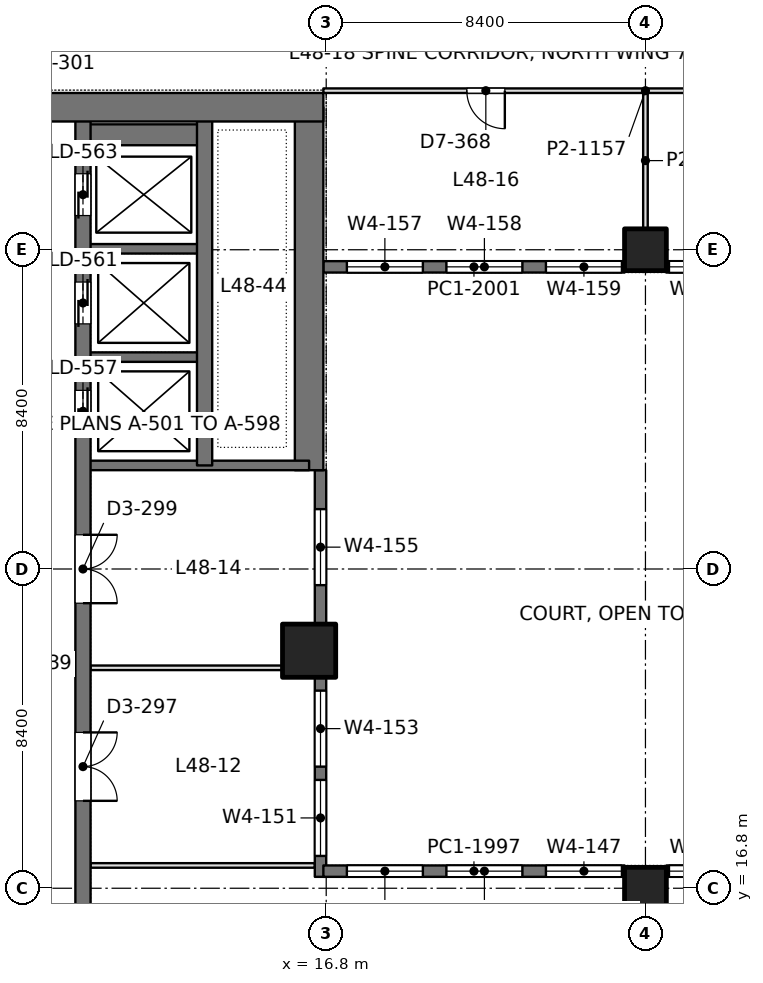
"""IFC4 building model, lengths in metres.
Left out: names, types, materials, properties, quantities, classifications, styles, units other than length and angle.
Written with IfcOpenShell. Run it as: python <this file> out.ifc"""

import sys

from ifc_helpers import new_model, si_unit, direction, frame, frame_2d, origin, origin_2d, place, context, subcontext, project, spatial, rectangle, extrude, element, fill, save


model = new_model("IFC4")
c1 = context("Model", 3, precision=1e-05, world=origin(), true_north=direction((0.0, 1.0)))
c2 = subcontext(c1, "Body", "Model", "MODEL_VIEW")
j1 = project(units=[si_unit("LENGTHUNIT", "METRE"), si_unit("PLANEANGLEUNIT", "RADIAN")], contexts=[c1])
p1 = place(None, origin())
s1 = spatial("IfcSite", under=j1, at=p1, CompositionType="ELEMENT")
p2 = place(p1, origin())
s2 = spatial("IfcBuilding", under=s1, at=p2, CompositionType="ELEMENT")
p3 = place(p2, frame((0.0, 0.0, 211.2)))
s3 = spatial("IfcBuildingStorey", under=s2, at=p3, CompositionType="ELEMENT", Elevation=211.2)
for number, where, z_axis, x_axis in (
    (1, (25.2, 16.8, 0.0), (0.0, 0.0, 1.0), (1.0, 0.0, 0.0)),
    (2, (25.2, 33.6, 0.0), (0.0, 0.0, 1.0), (1.0, 0.0, 0.0)),
):
    element("IfcColumn", number, at=place(p3, frame(where, z_axis=z_axis, x_axis=x_axis)), inside=s3, PredefinedType="COLUMN", context=c2, shape_type="SweptSolid", body=[
        extrude(rectangle(XDim=1.1, YDim=1.1, at=origin_2d()), origin(), (0.0, 0.0, 1.0), 4.2),
    ])
p4 = place(p3, frame((16.35, 23.05, 0.0), z_axis=(0.0, 0.0, 1.0), x_axis=(1.0, 0.0, 0.0)))
e3 = element("IfcColumn", 3, at=p4, inside=s3, PredefinedType="COLUMN", context=c2, shape_type="SweptSolid", body=[
    extrude(rectangle(XDim=1.4, YDim=1.4, at=origin_2d()), origin(), (0.0, 0.0, 1.0), 4.2),
])
p5 = place(p3, frame((-1.125, 37.35, 0.0), z_axis=(0.0, 0.0, 1.0), x_axis=(1.0, 0.0, 0.0)))
e4 = element("IfcWall", 4, at=p5, inside=s3, PredefinedType="SHEAR", context=c2, shape_type="SweptSolid", body=[
    extrude(rectangle(XDim=17.85, YDim=0.75, at=frame_2d((8.925, 0.0))), origin(), (0.0, 0.0, 1.0), 4.2),
])
p6 = place(p5, frame((8.875, 0.0, 0.0)))
e5 = element("IfcOpeningElement", 5, at=p6, cuts=e4, PredefinedType="OPENING", context=c2, shape_type="SweptSolid", body=[
    extrude(rectangle(XDim=1.8, YDim=2.4, at=frame_2d((0.9, 1.2))), frame((0.0, 0.385, 0.0), z_axis=(0.0, -1.0, 0.0), x_axis=(1.0, 0.0, 0.0)), (0.0, 0.0, 1.0), 0.77),
])
p7 = place(p3, frame((16.35, 27.8, 0.0), z_axis=(0.0, 0.0, 1.0), x_axis=(0.0, 1.0, 0.0)))
e6 = element("IfcWall", 6, at=p7, inside=s3, PredefinedType="SHEAR", context=c2, shape_type="SweptSolid", body=[
    extrude(rectangle(XDim=9.55, YDim=0.75, at=frame_2d((4.775, 0.0))), origin(), (0.0, 0.0, 1.0), 4.2),
])
p8 = place(p3, frame((10.4, 13.05, 0.0), z_axis=(0.0, 0.0, 1.0), x_axis=(0.0, 1.0, 0.0)))
e7 = element("IfcWall", 7, at=p8, inside=s3, PredefinedType="SHEAR", context=c2, shape_type="SweptSolid", body=[
    extrude(rectangle(XDim=24.3, YDim=0.4, at=frame_2d((12.15, 0.0))), origin(), (0.0, 0.0, 1.0), 4.2),
])
p9 = place(p8, frame((15.75, 0.0, 0.0)))
e8 = element("IfcOpeningElement", 8, at=p9, cuts=e7, PredefinedType="OPENING", context=c2, shape_type="SweptSolid", body=[
    extrude(rectangle(XDim=1.1, YDim=2.2, at=frame_2d((0.55, 1.1))), frame((0.0, 0.21, 0.0), z_axis=(0.0, -1.0, 0.0), x_axis=(1.0, 0.0, 0.0)), (0.0, 0.0, 1.0), 0.42),
])
p10 = place(p8, frame((18.6, 0.0, 0.0)))
e9 = element("IfcOpeningElement", 9, at=p10, cuts=e7, PredefinedType="OPENING", context=c2, shape_type="SweptSolid", body=[
    extrude(rectangle(XDim=1.1, YDim=2.2, at=frame_2d((0.55, 1.1))), frame((0.0, 0.21, 0.0), z_axis=(0.0, -1.0, 0.0), x_axis=(1.0, 0.0, 0.0)), (0.0, 0.0, 1.0), 0.42),
])
p11 = place(p8, frame((21.45, 0.0, 0.0)))
e10 = element("IfcOpeningElement", 10, at=p11, cuts=e7, PredefinedType="OPENING", context=c2, shape_type="SweptSolid", body=[
    extrude(rectangle(XDim=1.1, YDim=2.2, at=frame_2d((0.55, 1.1))), frame((0.0, 0.21, 0.0), z_axis=(0.0, -1.0, 0.0), x_axis=(1.0, 0.0, 0.0)), (0.0, 0.0, 1.0), 0.42),
])
p12 = place(p8, frame((6.05, 0.0, 0.0)))
e11 = element("IfcOpeningElement", 11, at=p12, cuts=e7, PredefinedType="OPENING", context=c2, shape_type="SweptSolid", body=[
    extrude(rectangle(XDim=1.8, YDim=2.4, at=frame_2d((0.9, 1.2))), frame((0.0, 0.21, 0.0), z_axis=(0.0, -1.0, 0.0), x_axis=(1.0, 0.0, 0.0)), (0.0, 0.0, 1.0), 0.42),
])
p13 = place(p8, frame((11.25, 0.0, 0.0)))
e12 = element("IfcOpeningElement", 12, at=p13, cuts=e7, PredefinedType="OPENING", context=c2, shape_type="SweptSolid", body=[
    extrude(rectangle(XDim=1.8, YDim=2.4, at=frame_2d((0.9, 1.2))), frame((0.0, 0.21, 0.0), z_axis=(0.0, -1.0, 0.0), x_axis=(1.0, 0.0, 0.0)), (0.0, 0.0, 1.0), 0.42),
])
p14 = place(p3, frame((13.6, 27.925, 0.0), z_axis=(0.0, 0.0, 1.0), x_axis=(0.0, 1.0, 0.0)))
e13 = element("IfcWall", 13, at=p14, inside=s3, PredefinedType="SHEAR", context=c2, shape_type="SweptSolid", body=[
    extrude(rectangle(XDim=9.425, YDim=0.4, at=frame_2d((4.712, 0.0))), origin(), (0.0, 0.0, 1.0), 4.2),
])
p15 = place(p3, frame((10.4, 27.925, 0.0), z_axis=(0.0, 0.0, 1.0), x_axis=(1.0, 0.0, 0.0)))
e14 = element("IfcWall", 14, at=p15, inside=s3, PredefinedType="SHEAR", context=c2, shape_type="SweptSolid", body=[
    extrude(rectangle(XDim=5.95, YDim=0.25, at=frame_2d((2.975, 0.0))), origin(), (0.0, 0.0, 1.0), 4.2),
])
for number, where, z_axis, x_axis in (
    (15, (10.4, 30.775, 0.0), (0.0, 0.0, 1.0), (1.0, 0.0, 0.0)),
    (16, (10.4, 33.625, 0.0), (0.0, 0.0, 1.0), (1.0, 0.0, 0.0)),
):
    element("IfcWall", number, at=place(p3, frame(where, z_axis=z_axis, x_axis=x_axis)), inside=s3, PredefinedType="SHEAR", context=c2, shape_type="SweptSolid", body=[
        extrude(rectangle(XDim=3.2, YDim=0.25, at=frame_2d((1.6, 0.0))), origin(), (0.0, 0.0, 1.0), 4.2),
    ])
p16 = place(p3, frame((10.4, 36.625, 0.0), z_axis=(0.0, 0.0, 1.0), x_axis=(1.0, 0.0, 0.0)))
e17 = element("IfcWall", 17, at=p16, inside=s3, PredefinedType="SHEAR", context=c2, shape_type="SweptSolid", body=[
    extrude(rectangle(XDim=3.2, YDim=0.55, at=frame_2d((1.6, 0.0))), origin(), (0.0, 0.0, 1.0), 4.2),
])
p17 = place(p3, frame((16.65, 17.1, 0.0), z_axis=(0.0, 0.0, 1.0), x_axis=(0.0, 1.0, 0.0)))
e18 = element("IfcWall", 18, at=p17, inside=s3, PredefinedType="SOLIDWALL", context=c2, shape_type="SweptSolid", body=[
    extrude(rectangle(XDim=10.7, YDim=0.3, at=frame_2d((5.35, 0.0))), origin(), (0.0, 0.0, 1.0), 4.05),
])
p18 = place(p17, frame((0.55, 0.0, 0.9)))
e19 = element("IfcOpeningElement", 19, at=p18, cuts=e18, PredefinedType="OPENING", context=c2, shape_type="SweptSolid", body=[
    extrude(rectangle(XDim=2.0, YDim=1.9, at=frame_2d((1.0, 0.95))), frame((0.0, 0.16, 0.0), z_axis=(0.0, -1.0, 0.0), x_axis=(1.0, 0.0, 0.0)), (0.0, 0.0, 1.0), 0.32),
])
p19 = place(p17, frame((2.9, 0.0, 0.9)))
e20 = element("IfcOpeningElement", 20, at=p19, cuts=e18, PredefinedType="OPENING", context=c2, shape_type="SweptSolid", body=[
    extrude(rectangle(XDim=2.0, YDim=1.9, at=frame_2d((1.0, 0.95))), frame((0.0, 0.16, 0.0), z_axis=(0.0, -1.0, 0.0), x_axis=(1.0, 0.0, 0.0)), (0.0, 0.0, 1.0), 0.32),
])
p20 = place(p17, frame((7.675, 0.0, 0.9)))
e21 = element("IfcOpeningElement", 21, at=p20, cuts=e18, PredefinedType="OPENING", context=c2, shape_type="SweptSolid", body=[
    extrude(rectangle(XDim=2.0, YDim=1.9, at=frame_2d((1.0, 0.95))), frame((0.0, 0.16, 0.0), z_axis=(0.0, -1.0, 0.0), x_axis=(1.0, 0.0, 0.0)), (0.0, 0.0, 1.0), 0.32),
])
p21 = place(p3, frame((16.725, 17.25, 0.0), z_axis=(0.0, 0.0, 1.0), x_axis=(1.0, 0.0, 0.0)))
e22 = element("IfcWall", 22, at=p21, inside=s3, PredefinedType="SOLIDWALL", context=c2, shape_type="SweptSolid", body=[
    extrude(rectangle(XDim=7.925, YDim=0.3, at=frame_2d((3.962, 0.0))), origin(), (0.0, 0.0, 1.0), 4.05),
])
p22 = place(p21, frame((0.619, 0.0, 0.9)))
e23 = element("IfcOpeningElement", 23, at=p22, cuts=e22, PredefinedType="OPENING", context=c2, shape_type="SweptSolid", body=[
    extrude(rectangle(XDim=2.0, YDim=1.9, at=frame_2d((1.0, 0.95))), frame((0.0, 0.16, 0.0), z_axis=(0.0, -1.0, 0.0), x_axis=(1.0, 0.0, 0.0)), (0.0, 0.0, 1.0), 0.32),
])
p23 = place(p21, frame((3.238, 0.0, 0.9)))
e24 = element("IfcOpeningElement", 24, at=p23, cuts=e22, PredefinedType="OPENING", context=c2, shape_type="SweptSolid", body=[
    extrude(rectangle(XDim=2.0, YDim=1.9, at=frame_2d((1.0, 0.95))), frame((0.0, 0.16, 0.0), z_axis=(0.0, -1.0, 0.0), x_axis=(1.0, 0.0, 0.0)), (0.0, 0.0, 1.0), 0.32),
])
p24 = place(p21, frame((5.856, 0.0, 0.9)))
e25 = element("IfcOpeningElement", 25, at=p24, cuts=e22, PredefinedType="OPENING", context=c2, shape_type="SweptSolid", body=[
    extrude(rectangle(XDim=2.0, YDim=1.9, at=frame_2d((1.0, 0.95))), frame((0.0, 0.16, 0.0), z_axis=(0.0, -1.0, 0.0), x_axis=(1.0, 0.0, 0.0)), (0.0, 0.0, 1.0), 0.32),
])
p25 = place(p3, frame((25.75, 17.25, 0.0), z_axis=(0.0, 0.0, 1.0), x_axis=(1.0, 0.0, 0.0)))
e26 = element("IfcWall", 26, at=p25, inside=s3, PredefinedType="SOLIDWALL", context=c2, shape_type="SweptSolid", body=[
    extrude(rectangle(XDim=7.925, YDim=0.3, at=frame_2d((3.962, 0.0))), origin(), (0.0, 0.0, 1.0), 4.05),
])
p26 = place(p25, frame((0.069, 0.0, 0.9)))
e27 = element("IfcOpeningElement", 27, at=p26, cuts=e26, PredefinedType="OPENING", context=c2, shape_type="SweptSolid", body=[
    extrude(rectangle(XDim=2.0, YDim=1.9, at=frame_2d((1.0, 0.95))), frame((0.0, 0.16, 0.0), z_axis=(0.0, -1.0, 0.0), x_axis=(1.0, 0.0, 0.0)), (0.0, 0.0, 1.0), 0.32),
])
p27 = place(p25, frame((2.688, 0.0, 0.9)))
e28 = element("IfcOpeningElement", 28, at=p27, cuts=e26, PredefinedType="OPENING", context=c2, shape_type="SweptSolid", body=[
    extrude(rectangle(XDim=2.0, YDim=1.9, at=frame_2d((1.0, 0.95))), frame((0.0, 0.16, 0.0), z_axis=(0.0, -1.0, 0.0), x_axis=(1.0, 0.0, 0.0)), (0.0, 0.0, 1.0), 0.32),
])
p28 = place(p25, frame((5.306, 0.0, 0.9)))
e29 = element("IfcOpeningElement", 29, at=p28, cuts=e26, PredefinedType="OPENING", context=c2, shape_type="SweptSolid", body=[
    extrude(rectangle(XDim=2.0, YDim=1.9, at=frame_2d((1.0, 0.95))), frame((0.0, 0.16, 0.0), z_axis=(0.0, -1.0, 0.0), x_axis=(1.0, 0.0, 0.0)), (0.0, 0.0, 1.0), 0.32),
])
p29 = place(p3, frame((16.725, 33.15, 0.0), z_axis=(0.0, 0.0, 1.0), x_axis=(1.0, 0.0, 0.0)))
e30 = element("IfcWall", 30, at=p29, inside=s3, PredefinedType="SOLIDWALL", context=c2, shape_type="SweptSolid", body=[
    extrude(rectangle(XDim=7.925, YDim=0.3, at=frame_2d((3.962, 0.0))), origin(), (0.0, 0.0, 1.0), 4.05),
])
p30 = place(p29, frame((0.619, 0.0, 0.9)))
e31 = element("IfcOpeningElement", 31, at=p30, cuts=e30, PredefinedType="OPENING", context=c2, shape_type="SweptSolid", body=[
    extrude(rectangle(XDim=2.0, YDim=1.9, at=frame_2d((1.0, 0.95))), frame((0.0, 0.16, 0.0), z_axis=(0.0, -1.0, 0.0), x_axis=(1.0, 0.0, 0.0)), (0.0, 0.0, 1.0), 0.32),
])
p31 = place(p29, frame((3.238, 0.0, 0.9)))
e32 = element("IfcOpeningElement", 32, at=p31, cuts=e30, PredefinedType="OPENING", context=c2, shape_type="SweptSolid", body=[
    extrude(rectangle(XDim=2.0, YDim=1.9, at=frame_2d((1.0, 0.95))), frame((0.0, 0.16, 0.0), z_axis=(0.0, -1.0, 0.0), x_axis=(1.0, 0.0, 0.0)), (0.0, 0.0, 1.0), 0.32),
])
p32 = place(p29, frame((5.856, 0.0, 0.9)))
e33 = element("IfcOpeningElement", 33, at=p32, cuts=e30, PredefinedType="OPENING", context=c2, shape_type="SweptSolid", body=[
    extrude(rectangle(XDim=2.0, YDim=1.9, at=frame_2d((1.0, 0.95))), frame((0.0, 0.16, 0.0), z_axis=(0.0, -1.0, 0.0), x_axis=(1.0, 0.0, 0.0)), (0.0, 0.0, 1.0), 0.32),
])
p33 = place(p3, frame((25.75, 33.15, 0.0), z_axis=(0.0, 0.0, 1.0), x_axis=(1.0, 0.0, 0.0)))
e34 = element("IfcWall", 34, at=p33, inside=s3, PredefinedType="SOLIDWALL", context=c2, shape_type="SweptSolid", body=[
    extrude(rectangle(XDim=7.925, YDim=0.3, at=frame_2d((3.962, 0.0))), origin(), (0.0, 0.0, 1.0), 4.05),
])
p34 = place(p33, frame((0.069, 0.0, 0.9)))
e35 = element("IfcOpeningElement", 35, at=p34, cuts=e34, PredefinedType="OPENING", context=c2, shape_type="SweptSolid", body=[
    extrude(rectangle(XDim=2.0, YDim=1.9, at=frame_2d((1.0, 0.95))), frame((0.0, 0.16, 0.0), z_axis=(0.0, -1.0, 0.0), x_axis=(1.0, 0.0, 0.0)), (0.0, 0.0, 1.0), 0.32),
])
p35 = place(p33, frame((2.688, 0.0, 0.9)))
e36 = element("IfcOpeningElement", 36, at=p35, cuts=e34, PredefinedType="OPENING", context=c2, shape_type="SweptSolid", body=[
    extrude(rectangle(XDim=2.0, YDim=1.9, at=frame_2d((1.0, 0.95))), frame((0.0, 0.16, 0.0), z_axis=(0.0, -1.0, 0.0), x_axis=(1.0, 0.0, 0.0)), (0.0, 0.0, 1.0), 0.32),
])
p36 = place(p33, frame((5.306, 0.0, 0.9)))
e37 = element("IfcOpeningElement", 37, at=p36, cuts=e34, PredefinedType="OPENING", context=c2, shape_type="SweptSolid", body=[
    extrude(rectangle(XDim=2.0, YDim=1.9, at=frame_2d((1.0, 0.95))), frame((0.0, 0.16, 0.0), z_axis=(0.0, -1.0, 0.0), x_axis=(1.0, 0.0, 0.0)), (0.0, 0.0, 1.0), 0.32),
])
p37 = place(p3, frame((10.598, 17.4, 0.0), z_axis=(0.0, 0.0, 1.0), x_axis=(1.0, 0.0, 0.0)))
e38 = element("IfcWall", 38, at=p37, inside=s3, PredefinedType="PARTITIONING", context=c2, shape_type="SweptSolid", body=[
    extrude(rectangle(XDim=5.904, YDim=0.12, at=frame_2d((2.952, 0.0))), origin(), (0.0, 0.0, 1.0), 3.55),
])
p38 = place(p3, frame((10.598, 22.6, 0.0), z_axis=(0.0, 0.0, 1.0), x_axis=(1.0, 0.0, 0.0)))
e39 = element("IfcWall", 39, at=p38, inside=s3, PredefinedType="PARTITIONING", context=c2, shape_type="SweptSolid", body=[
    extrude(rectangle(XDim=5.053, YDim=0.12, at=frame_2d((2.526, 0.0))), origin(), (0.0, 0.0, 1.0), 4.05),
])
p39 = place(p3, frame((25.2, 34.149, 0.0), z_axis=(0.0, 0.0, 1.0), x_axis=(0.0, 1.0, 0.0)))
e40 = element("IfcWall", 40, at=p39, inside=s3, PredefinedType="PARTITIONING", context=c2, shape_type="SweptSolid", body=[
    extrude(rectangle(XDim=3.593, YDim=0.12, at=frame_2d((1.796, 0.0))), origin(), (0.0, 0.0, 1.0), 3.55),
])
p40 = place(p3, frame((16.725, 37.785, 0.0), z_axis=(0.0, 0.0, 1.0), x_axis=(1.0, 0.0, 0.0)))
e41 = element("IfcWall", 41, at=p40, inside=s3, PredefinedType="PARTITIONING", context=c2, shape_type="SweptSolid", body=[
    extrude(rectangle(XDim=16.95, YDim=0.12, at=frame_2d((8.475, 0.0))), origin(), (0.0, 0.0, 1.0), 3.55),
])
p41 = place(p40, frame((3.775, 0.0, 0.0)))
e42 = element("IfcOpeningElement", 42, at=p41, cuts=e41, PredefinedType="OPENING", context=c2, shape_type="SweptSolid", body=[
    extrude(rectangle(XDim=1.0, YDim=2.4, at=frame_2d((0.5, 1.2))), frame((0.0, 0.07, 0.0), z_axis=(0.0, -1.0, 0.0), x_axis=(1.0, 0.0, 0.0)), (0.0, 0.0, 1.0), 0.14),
])
p42 = place(p40, frame((12.175, 0.0, 0.0)))
e43 = element("IfcOpeningElement", 43, at=p42, cuts=e41, PredefinedType="OPENING", context=c2, shape_type="SweptSolid", body=[
    extrude(rectangle(XDim=1.0, YDim=2.4, at=frame_2d((0.5, 1.2))), frame((0.0, 0.07, 0.0), z_axis=(0.0, -1.0, 0.0), x_axis=(1.0, 0.0, 0.0)), (0.0, 0.0, 1.0), 0.14),
])
p43 = place(p18, origin())
e44 = element("IfcWindow", 44, at=p43, inside=s3, PartitioningType="SINGLE_PANEL", PredefinedType="WINDOW", context=c2, shape_type="SweptSolid", body=[
    extrude(rectangle(XDim=2.0, YDim=1.9, at=frame_2d((1.0, 0.95))), frame((0.0, 0.03, 0.0), z_axis=(0.0, -1.0, 0.0), x_axis=(1.0, 0.0, 0.0)), (0.0, 0.0, 1.0), 0.06),
])
fill(e19, e44)
p44 = place(p19, origin())
e45 = element("IfcWindow", 45, at=p44, inside=s3, PartitioningType="SINGLE_PANEL", PredefinedType="WINDOW", context=c2, shape_type="SweptSolid", body=[
    extrude(rectangle(XDim=2.0, YDim=1.9, at=frame_2d((1.0, 0.95))), frame((0.0, 0.03, 0.0), z_axis=(0.0, -1.0, 0.0), x_axis=(1.0, 0.0, 0.0)), (0.0, 0.0, 1.0), 0.06),
])
fill(e20, e45)
p45 = place(p20, origin())
e46 = element("IfcWindow", 46, at=p45, inside=s3, PartitioningType="SINGLE_PANEL", PredefinedType="WINDOW", context=c2, shape_type="SweptSolid", body=[
    extrude(rectangle(XDim=2.0, YDim=1.9, at=frame_2d((1.0, 0.95))), frame((0.0, 0.03, 0.0), z_axis=(0.0, -1.0, 0.0), x_axis=(1.0, 0.0, 0.0)), (0.0, 0.0, 1.0), 0.06),
])
fill(e21, e46)
p46 = place(p22, origin())
e47 = element("IfcWindow", 47, at=p46, inside=s3, PartitioningType="SINGLE_PANEL", PredefinedType="WINDOW", context=c2, shape_type="SweptSolid", body=[
    extrude(rectangle(XDim=2.0, YDim=1.9, at=frame_2d((1.0, 0.95))), frame((0.0, 0.03, 0.0), z_axis=(0.0, -1.0, 0.0), x_axis=(1.0, 0.0, 0.0)), (0.0, 0.0, 1.0), 0.06),
])
fill(e23, e47)
p47 = place(p23, origin())
e48 = element("IfcWindow", 48, at=p47, inside=s3, PartitioningType="SINGLE_PANEL", PredefinedType="WINDOW", context=c2, shape_type="SweptSolid", body=[
    extrude(rectangle(XDim=2.0, YDim=1.9, at=frame_2d((1.0, 0.95))), frame((0.0, 0.03, 0.0), z_axis=(0.0, -1.0, 0.0), x_axis=(1.0, 0.0, 0.0)), (0.0, 0.0, 1.0), 0.06),
])
fill(e24, e48)
p48 = place(p24, origin())
e49 = element("IfcWindow", 49, at=p48, inside=s3, PartitioningType="SINGLE_PANEL", PredefinedType="WINDOW", context=c2, shape_type="SweptSolid", body=[
    extrude(rectangle(XDim=2.0, YDim=1.9, at=frame_2d((1.0, 0.95))), frame((0.0, 0.03, 0.0), z_axis=(0.0, -1.0, 0.0), x_axis=(1.0, 0.0, 0.0)), (0.0, 0.0, 1.0), 0.06),
])
fill(e25, e49)
p49 = place(p26, origin())
e50 = element("IfcWindow", 50, at=p49, inside=s3, PartitioningType="SINGLE_PANEL", PredefinedType="WINDOW", context=c2, shape_type="SweptSolid", body=[
    extrude(rectangle(XDim=2.0, YDim=1.9, at=frame_2d((1.0, 0.95))), frame((0.0, 0.03, 0.0), z_axis=(0.0, -1.0, 0.0), x_axis=(1.0, 0.0, 0.0)), (0.0, 0.0, 1.0), 0.06),
])
fill(e27, e50)
p50 = place(p30, origin())
e51 = element("IfcWindow", 51, at=p50, inside=s3, PartitioningType="SINGLE_PANEL", PredefinedType="WINDOW", context=c2, shape_type="SweptSolid", body=[
    extrude(rectangle(XDim=2.0, YDim=1.9, at=frame_2d((1.0, 0.95))), frame((0.0, 0.03, 0.0), z_axis=(0.0, -1.0, 0.0), x_axis=(1.0, 0.0, 0.0)), (0.0, 0.0, 1.0), 0.06),
])
fill(e31, e51)
p51 = place(p31, origin())
e52 = element("IfcWindow", 52, at=p51, inside=s3, PartitioningType="SINGLE_PANEL", PredefinedType="WINDOW", context=c2, shape_type="SweptSolid", body=[
    extrude(rectangle(XDim=2.0, YDim=1.9, at=frame_2d((1.0, 0.95))), frame((0.0, 0.03, 0.0), z_axis=(0.0, -1.0, 0.0), x_axis=(1.0, 0.0, 0.0)), (0.0, 0.0, 1.0), 0.06),
])
fill(e32, e52)
p52 = place(p32, origin())
e53 = element("IfcWindow", 53, at=p52, inside=s3, PartitioningType="SINGLE_PANEL", PredefinedType="WINDOW", context=c2, shape_type="SweptSolid", body=[
    extrude(rectangle(XDim=2.0, YDim=1.9, at=frame_2d((1.0, 0.95))), frame((0.0, 0.03, 0.0), z_axis=(0.0, -1.0, 0.0), x_axis=(1.0, 0.0, 0.0)), (0.0, 0.0, 1.0), 0.06),
])
fill(e33, e53)
p53 = place(p34, origin())
e54 = element("IfcWindow", 54, at=p53, inside=s3, PartitioningType="SINGLE_PANEL", PredefinedType="WINDOW", context=c2, shape_type="SweptSolid", body=[
    extrude(rectangle(XDim=2.0, YDim=1.9, at=frame_2d((1.0, 0.95))), frame((0.0, 0.03, 0.0), z_axis=(0.0, -1.0, 0.0), x_axis=(1.0, 0.0, 0.0)), (0.0, 0.0, 1.0), 0.06),
])
fill(e35, e54)
p54 = place(p9, origin())
e55 = element("IfcDoor", 55, at=p54, inside=s3, OperationType="DOUBLE_DOOR_SLIDING", PredefinedType="DOOR", context=c2, shape_type="SweptSolid", body=[
    extrude(rectangle(XDim=1.1, YDim=2.2, at=frame_2d((0.55, 1.1))), frame((0.0, 0.025, 0.0), z_axis=(0.0, -1.0, 0.0), x_axis=(1.0, 0.0, 0.0)), (0.0, 0.0, 1.0), 0.05),
])
fill(e8, e55)
p55 = place(p10, origin())
e56 = element("IfcDoor", 56, at=p55, inside=s3, OperationType="DOUBLE_DOOR_SLIDING", PredefinedType="DOOR", context=c2, shape_type="SweptSolid", body=[
    extrude(rectangle(XDim=1.1, YDim=2.2, at=frame_2d((0.55, 1.1))), frame((0.0, 0.025, 0.0), z_axis=(0.0, -1.0, 0.0), x_axis=(1.0, 0.0, 0.0)), (0.0, 0.0, 1.0), 0.05),
])
fill(e9, e56)
p56 = place(p11, origin())
e57 = element("IfcDoor", 57, at=p56, inside=s3, OperationType="DOUBLE_DOOR_SLIDING", PredefinedType="DOOR", context=c2, shape_type="SweptSolid", body=[
    extrude(rectangle(XDim=1.1, YDim=2.2, at=frame_2d((0.55, 1.1))), frame((0.0, 0.025, 0.0), z_axis=(0.0, -1.0, 0.0), x_axis=(1.0, 0.0, 0.0)), (0.0, 0.0, 1.0), 0.05),
])
fill(e10, e57)
p57 = place(p12, frame((1.8, 0.0, 0.0), z_axis=(0.0, 0.0, 1.0), x_axis=(-1.0, 0.0, 0.0)))
e58 = element("IfcDoor", 58, at=p57, inside=s3, OperationType="DOUBLE_DOOR_SINGLE_SWING", PredefinedType="DOOR", context=c2, shape_type="SweptSolid", body=[
    extrude(rectangle(XDim=1.8, YDim=2.4, at=frame_2d((0.9, 1.2))), frame((0.0, 0.025, 0.0), z_axis=(0.0, -1.0, 0.0), x_axis=(1.0, 0.0, 0.0)), (0.0, 0.0, 1.0), 0.05),
])
fill(e11, e58)
p58 = place(p13, frame((1.8, 0.0, 0.0), z_axis=(0.0, 0.0, 1.0), x_axis=(-1.0, 0.0, 0.0)))
e59 = element("IfcDoor", 59, at=p58, inside=s3, OperationType="DOUBLE_DOOR_SINGLE_SWING", PredefinedType="DOOR", context=c2, shape_type="SweptSolid", body=[
    extrude(rectangle(XDim=1.8, YDim=2.4, at=frame_2d((0.9, 1.2))), frame((0.0, 0.025, 0.0), z_axis=(0.0, -1.0, 0.0), x_axis=(1.0, 0.0, 0.0)), (0.0, 0.0, 1.0), 0.05),
])
fill(e12, e59)
p59 = place(p41, frame((1.0, 0.0, 0.0), z_axis=(0.0, 0.0, 1.0), x_axis=(-1.0, 0.0, 0.0)))
e60 = element("IfcDoor", 60, at=p59, inside=s3, OperationType="SINGLE_SWING_LEFT", PredefinedType="DOOR", context=c2, shape_type="SweptSolid", body=[
    extrude(rectangle(XDim=1.0, YDim=2.4, at=frame_2d((0.5, 1.2))), frame((0.0, 0.025, 0.0), z_axis=(0.0, -1.0, 0.0), x_axis=(1.0, 0.0, 0.0)), (0.0, 0.0, 1.0), 0.05),
])
fill(e42, e60)
save(model, sys.argv[1])
